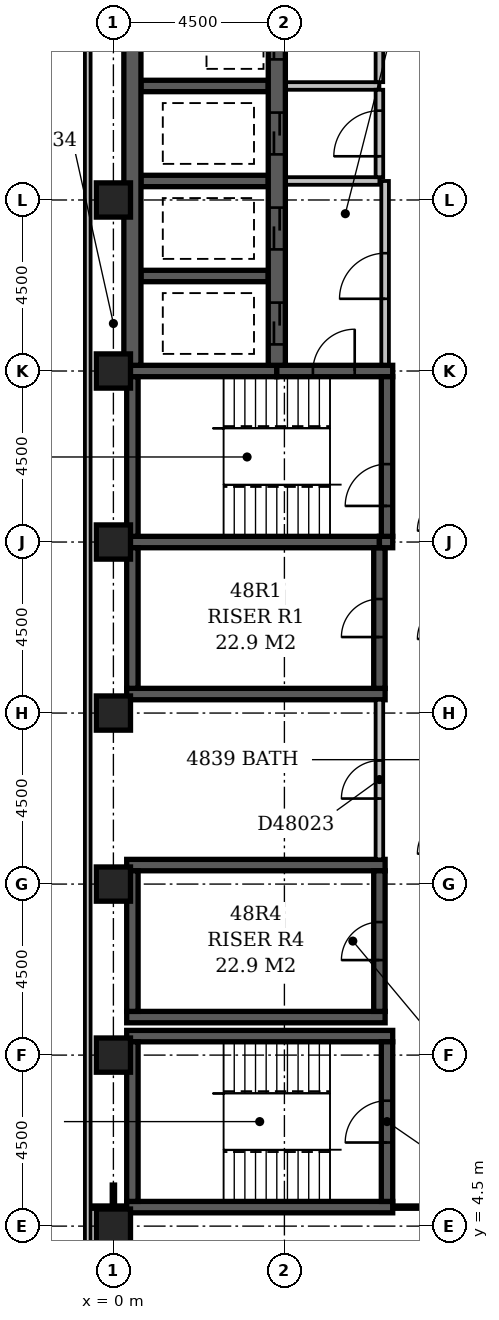
"""IFC4 building model, lengths in metres.
Left out: names, types, materials, properties, quantities, classifications, styles, units other than length and angle.
Written with IfcOpenShell. Run it as: python <this file> out.ifc"""

import sys

from ifc_helpers import new_model, si_unit, direction, frame, frame_2d, origin, origin_2d, place, context, subcontext, project, spatial, rectangle, extrude, element, fill, save


model = new_model("IFC4")
c1 = context("Model", 3, precision=1e-05, world=origin(), true_north=direction((0.0, 1.0)))
c2 = subcontext(c1, "Body", "Model", "MODEL_VIEW")
j1 = project(units=[si_unit("LENGTHUNIT", "METRE"), si_unit("PLANEANGLEUNIT", "RADIAN")], contexts=[c1])
p1 = place(None, origin())
s1 = spatial("IfcSite", under=j1, at=p1, CompositionType="ELEMENT")
p2 = place(p1, origin())
s2 = spatial("IfcBuilding", under=s1, at=p2, CompositionType="ELEMENT")
p3 = place(p2, frame((0.0, 0.0, 189.8)))
s3 = spatial("IfcBuildingStorey", under=s2, at=p3, CompositionType="ELEMENT", Elevation=189.8)
for number, where, z_axis, x_axis in (
    (1, (0.35, 5.0, -0.3), (0.0, 0.0, 1.0), (1.0, 0.0, 0.0)),
    (2, (0.35, 9.5, -0.3), (0.0, 0.0, 1.0), (1.0, 0.0, 0.0)),
):
    element("IfcWall", number, at=place(p3, frame(where, z_axis=z_axis, x_axis=x_axis)), inside=s3, PredefinedType="SHEAR", context=c2, shape_type="SweptSolid", body=[
        extrude(rectangle(XDim=7.0, YDim=0.3, at=frame_2d((3.5, 0.0))), origin(), (0.0, 0.0, 1.0), 3.6),
    ])
for number, where, z_axis, x_axis in (
    (3, (0.35, 10.0, -0.3), (0.0, 0.0, 1.0), (1.0, 0.0, 0.0)),
    (4, (0.35, 14.0, -0.3), (0.0, 0.0, 1.0), (1.0, 0.0, 0.0)),
    (5, (0.35, 18.5, -0.3), (0.0, 0.0, 1.0), (1.0, 0.0, 0.0)),
):
    element("IfcWall", number, at=place(p3, frame(where, z_axis=z_axis, x_axis=x_axis)), inside=s3, PredefinedType="SHEAR", context=c2, shape_type="SweptSolid", body=[
        extrude(rectangle(XDim=6.8, YDim=0.3, at=frame_2d((3.4, 0.0))), origin(), (0.0, 0.0, 1.0), 3.6),
    ])
p4 = place(p3, frame((0.35, 22.5, -0.3), z_axis=(0.0, 0.0, 1.0), x_axis=(1.0, 0.0, 0.0)))
e6 = element("IfcWall", 6, at=p4, inside=s3, PredefinedType="SHEAR", context=c2, shape_type="SweptSolid", body=[
    extrude(rectangle(XDim=6.65, YDim=0.3, at=frame_2d((3.325, 0.0))), origin(), (0.0, 0.0, 1.0), 3.6),
])
p5 = place(p3, frame((0.35, 27.0, -0.3), z_axis=(0.0, 0.0, 1.0), x_axis=(1.0, 0.0, 0.0)))
e7 = element("IfcWall", 7, at=p5, inside=s3, PredefinedType="SHEAR", context=c2, shape_type="SweptSolid", body=[
    extrude(rectangle(XDim=3.95, YDim=0.3, at=frame_2d((1.975, 0.0))), origin(), (0.0, 0.0, 1.0), 3.6),
])
p6 = place(p3, frame((0.5, 5.15, -0.3), z_axis=(0.0, 0.0, 1.0), x_axis=(0.0, 1.0, 0.0)))
e8 = element("IfcWall", 8, at=p6, inside=s3, PredefinedType="SHEAR", context=c2, shape_type="SweptSolid", body=[
    extrude(rectangle(XDim=4.2, YDim=0.3, at=frame_2d((2.1, 0.0))), origin(), (0.0, 0.0, 1.0), 3.6),
])
for number, where, z_axis, x_axis in (
    (9, (0.5, 10.15, -0.3), (0.0, 0.0, 1.0), (0.0, 1.0, 0.0)),
    (10, (0.5, 18.65, -0.3), (0.0, 0.0, 1.0), (0.0, 1.0, 0.0)),
):
    element("IfcWall", number, at=place(p3, frame(where, z_axis=z_axis, x_axis=x_axis)), inside=s3, PredefinedType="SHEAR", context=c2, shape_type="SweptSolid", body=[
        extrude(rectangle(XDim=3.7, YDim=0.3, at=frame_2d((1.85, 0.0))), origin(), (0.0, 0.0, 1.0), 3.6),
    ])
p7 = place(p3, frame((0.5, 22.65, -0.3), z_axis=(0.0, 0.0, 1.0), x_axis=(0.0, 1.0, 0.0)))
e11 = element("IfcWall", 11, at=p7, inside=s3, PredefinedType="SHEAR", context=c2, shape_type="SweptSolid", body=[
    extrude(rectangle(XDim=4.2, YDim=0.3, at=frame_2d((2.1, 0.0))), origin(), (0.0, 0.0, 1.0), 3.6),
])
p8 = place(p3, frame((0.5, 27.15, -0.3), z_axis=(0.0, 0.0, 1.0), x_axis=(0.0, 1.0, 0.0)))
e12 = element("IfcWall", 12, at=p8, inside=s3, PredefinedType="SHEAR", context=c2, shape_type="SweptSolid", body=[
    extrude(rectangle(XDim=22.125, YDim=0.45, at=frame_2d((11.062, 0.0))), origin(), (0.0, 0.0, 1.0), 3.6),
])
for number, where, z_axis, x_axis in (
    (13, (0.725, 29.5, -0.3), (0.0, 0.0, 1.0), (1.0, 0.0, 0.0)),
    (14, (0.725, 32.0, -0.3), (0.0, 0.0, 1.0), (1.0, 0.0, 0.0)),
    (15, (0.725, 34.5, -0.3), (0.0, 0.0, 1.0), (1.0, 0.0, 0.0)),
):
    element("IfcWall", number, at=place(p3, frame(where, z_axis=z_axis, x_axis=x_axis)), inside=s3, PredefinedType="SHEAR", context=c2, shape_type="SweptSolid", body=[
        extrude(rectangle(XDim=3.35, YDim=0.3, at=frame_2d((1.675, 0.0))), origin(), (0.0, 0.0, 1.0), 3.6),
    ])
p9 = place(p3, frame((4.3, 27.0, -0.3), z_axis=(0.0, 0.0, 1.0), x_axis=(1.0, 0.0, 0.0)))
e16 = element("IfcWall", 16, at=p9, inside=s3, PredefinedType="SHEAR", context=c2, shape_type="SweptSolid", body=[
    extrude(rectangle(XDim=3.05, YDim=0.3, at=frame_2d((1.525, 0.0))), origin(), (0.0, 0.0, 1.0), 3.6),
])
p10 = place(p9, frame((0.95, 0.0, 0.3)))
e17 = element("IfcOpeningElement", 17, at=p10, cuts=e16, PredefinedType="OPENING", context=c2, shape_type="SweptSolid", body=[
    extrude(rectangle(XDim=1.1, YDim=2.1, at=frame_2d((0.55, 1.05))), frame((0.0, 0.162, 0.0), z_axis=(0.0, -1.0, 0.0), x_axis=(1.0, 0.0, 0.0)), (0.0, 0.0, 1.0), 0.324),
])
p11 = place(p3, frame((4.3, 27.15, -0.3), z_axis=(0.0, 0.0, 1.0), x_axis=(0.0, 1.0, 0.0)))
e18 = element("IfcWall", 18, at=p11, inside=s3, PredefinedType="SHEAR", context=c2, shape_type="SweptSolid", body=[
    extrude(rectangle(XDim=22.125, YDim=0.45, at=frame_2d((11.062, 0.0))), origin(), (0.0, 0.0, 1.0), 3.6),
])
p12 = place(p11, frame((3.05, 0.0, 0.3)))
e19 = element("IfcOpeningElement", 19, at=p12, cuts=e18, PredefinedType="OPENING", context=c2, shape_type="SweptSolid", body=[
    extrude(rectangle(XDim=1.1, YDim=2.1, at=frame_2d((0.55, 1.05))), frame((0.0, 0.237, 0.0), z_axis=(0.0, -1.0, 0.0), x_axis=(1.0, 0.0, 0.0)), (0.0, 0.0, 1.0), 0.474),
])
p13 = place(p11, frame((0.55, 0.0, 0.3)))
e20 = element("IfcOpeningElement", 20, at=p13, cuts=e18, PredefinedType="OPENING", context=c2, shape_type="SweptSolid", body=[
    extrude(rectangle(XDim=1.1, YDim=2.1, at=frame_2d((0.55, 1.05))), frame((0.0, 0.237, 0.0), z_axis=(0.0, -1.0, 0.0), x_axis=(1.0, 0.0, 0.0)), (0.0, 0.0, 1.0), 0.474),
])
p14 = place(p11, frame((20.55, 0.0, 0.3)))
e21 = element("IfcOpeningElement", 21, at=p14, cuts=e18, PredefinedType="OPENING", context=c2, shape_type="SweptSolid", body=[
    extrude(rectangle(XDim=1.1, YDim=2.1, at=frame_2d((0.55, 1.05))), frame((0.0, 0.237, 0.0), z_axis=(0.0, -1.0, 0.0), x_axis=(1.0, 0.0, 0.0)), (0.0, 0.0, 1.0), 0.474),
])
p15 = place(p11, frame((18.05, 0.0, 0.3)))
e22 = element("IfcOpeningElement", 22, at=p15, cuts=e18, PredefinedType="OPENING", context=c2, shape_type="SweptSolid", body=[
    extrude(rectangle(XDim=1.1, YDim=2.1, at=frame_2d((0.55, 1.05))), frame((0.0, 0.237, 0.0), z_axis=(0.0, -1.0, 0.0), x_axis=(1.0, 0.0, 0.0)), (0.0, 0.0, 1.0), 0.474),
])
p16 = place(p11, frame((15.55, 0.0, 0.3)))
e23 = element("IfcOpeningElement", 23, at=p16, cuts=e18, PredefinedType="OPENING", context=c2, shape_type="SweptSolid", body=[
    extrude(rectangle(XDim=1.1, YDim=2.1, at=frame_2d((0.55, 1.05))), frame((0.0, 0.237, 0.0), z_axis=(0.0, -1.0, 0.0), x_axis=(1.0, 0.0, 0.0)), (0.0, 0.0, 1.0), 0.474),
])
p17 = place(p11, frame((13.05, 0.0, 0.3)))
e24 = element("IfcOpeningElement", 24, at=p17, cuts=e18, PredefinedType="OPENING", context=c2, shape_type="SweptSolid", body=[
    extrude(rectangle(XDim=1.1, YDim=2.1, at=frame_2d((0.55, 1.05))), frame((0.0, 0.237, 0.0), z_axis=(0.0, -1.0, 0.0), x_axis=(1.0, 0.0, 0.0)), (0.0, 0.0, 1.0), 0.474),
])
p18 = place(p11, frame((10.55, 0.0, 0.3)))
e25 = element("IfcOpeningElement", 25, at=p18, cuts=e18, PredefinedType="OPENING", context=c2, shape_type="SweptSolid", body=[
    extrude(rectangle(XDim=1.1, YDim=2.1, at=frame_2d((0.55, 1.05))), frame((0.0, 0.237, 0.0), z_axis=(0.0, -1.0, 0.0), x_axis=(1.0, 0.0, 0.0)), (0.0, 0.0, 1.0), 0.474),
])
p19 = place(p11, frame((8.05, 0.0, 0.3)))
e26 = element("IfcOpeningElement", 26, at=p19, cuts=e18, PredefinedType="OPENING", context=c2, shape_type="SweptSolid", body=[
    extrude(rectangle(XDim=1.1, YDim=2.1, at=frame_2d((0.55, 1.05))), frame((0.0, 0.237, 0.0), z_axis=(0.0, -1.0, 0.0), x_axis=(1.0, 0.0, 0.0)), (0.0, 0.0, 1.0), 0.474),
])
p20 = place(p11, frame((5.55, 0.0, 0.3)))
e27 = element("IfcOpeningElement", 27, at=p20, cuts=e18, PredefinedType="OPENING", context=c2, shape_type="SweptSolid", body=[
    extrude(rectangle(XDim=1.1, YDim=2.1, at=frame_2d((0.55, 1.05))), frame((0.0, 0.237, 0.0), z_axis=(0.0, -1.0, 0.0), x_axis=(1.0, 0.0, 0.0)), (0.0, 0.0, 1.0), 0.474),
])
p21 = place(p3, frame((7.0, 10.15, -0.3), z_axis=(0.0, 0.0, 1.0), x_axis=(0.0, 1.0, 0.0)))
e28 = element("IfcWall", 28, at=p21, inside=s3, PredefinedType="SHEAR", context=c2, shape_type="SweptSolid", body=[
    extrude(rectangle(XDim=3.7, YDim=0.3, at=frame_2d((1.85, 0.0))), origin(), (0.0, 0.0, 1.0), 3.6),
])
p22 = place(p21, frame((1.35, 0.0, 0.3)))
e29 = element("IfcOpeningElement", 29, at=p22, cuts=e28, PredefinedType="OPENING", context=c2, shape_type="SweptSolid", body=[
    extrude(rectangle(XDim=1.0, YDim=2.1, at=frame_2d((0.5, 1.05))), frame((0.0, 0.162, 0.0), z_axis=(0.0, -1.0, 0.0), x_axis=(1.0, 0.0, 0.0)), (0.0, 0.0, 1.0), 0.324),
])
p23 = place(p3, frame((7.0, 18.65, -0.3), z_axis=(0.0, 0.0, 1.0), x_axis=(0.0, 1.0, 0.0)))
e30 = element("IfcWall", 30, at=p23, inside=s3, PredefinedType="SHEAR", context=c2, shape_type="SweptSolid", body=[
    extrude(rectangle(XDim=3.7, YDim=0.3, at=frame_2d((1.85, 0.0))), origin(), (0.0, 0.0, 1.0), 3.6),
])
p24 = place(p23, frame((1.35, 0.0, 0.3)))
e31 = element("IfcOpeningElement", 31, at=p24, cuts=e30, PredefinedType="OPENING", context=c2, shape_type="SweptSolid", body=[
    extrude(rectangle(XDim=1.0, YDim=2.1, at=frame_2d((0.5, 1.05))), frame((0.0, 0.162, 0.0), z_axis=(0.0, -1.0, 0.0), x_axis=(1.0, 0.0, 0.0)), (0.0, 0.0, 1.0), 0.324),
])
p25 = place(p3, frame((7.0, 22.5, -0.3), z_axis=(0.0, 0.0, 1.0), x_axis=(1.0, 0.0, 0.0)))
e32 = element("IfcWall", 32, at=p25, inside=s3, PredefinedType="SHEAR", context=c2, shape_type="SweptSolid", body=[
    extrude(rectangle(XDim=0.35, YDim=0.3, at=frame_2d((0.175, 0.0))), origin(), (0.0, 0.0, 1.0), 3.6),
])
p26 = place(p3, frame((7.2, 5.15, -0.3), z_axis=(0.0, 0.0, 1.0), x_axis=(0.0, 1.0, 0.0)))
e33 = element("IfcWall", 33, at=p26, inside=s3, PredefinedType="SHEAR", context=c2, shape_type="SweptSolid", body=[
    extrude(rectangle(XDim=4.2, YDim=0.3, at=frame_2d((2.1, 0.0))), origin(), (0.0, 0.0, 1.0), 3.6),
])
p27 = place(p26, frame((1.55, 0.0, 0.3)))
e34 = element("IfcOpeningElement", 34, at=p27, cuts=e33, PredefinedType="OPENING", context=c2, shape_type="SweptSolid", body=[
    extrude(rectangle(XDim=1.1, YDim=2.1, at=frame_2d((0.55, 1.05))), frame((0.0, 0.162, 0.0), z_axis=(0.0, -1.0, 0.0), x_axis=(1.0, 0.0, 0.0)), (0.0, 0.0, 1.0), 0.324),
])
p28 = place(p3, frame((7.2, 22.65, -0.3), z_axis=(0.0, 0.0, 1.0), x_axis=(0.0, 1.0, 0.0)))
e35 = element("IfcWall", 35, at=p28, inside=s3, PredefinedType="SHEAR", context=c2, shape_type="SweptSolid", body=[
    extrude(rectangle(XDim=4.2, YDim=0.3, at=frame_2d((2.1, 0.0))), origin(), (0.0, 0.0, 1.0), 3.6),
])
p29 = place(p28, frame((0.8, 0.0, 0.3)))
e36 = element("IfcOpeningElement", 36, at=p29, cuts=e35, PredefinedType="OPENING", context=c2, shape_type="SweptSolid", body=[
    extrude(rectangle(XDim=1.1, YDim=2.1, at=frame_2d((0.55, 1.05))), frame((0.0, 0.162, 0.0), z_axis=(0.0, -1.0, 0.0), x_axis=(1.0, 0.0, 0.0)), (0.0, 0.0, 1.0), 0.324),
])
for number, where, z_axis, x_axis in (
    (37, (0.0, 4.5, -0.3), (0.0, 0.0, 1.0), (1.0, 0.0, 0.0)),
    (38, (0.0, 9.0, -0.3), (0.0, 0.0, 1.0), (1.0, 0.0, 0.0)),
    (39, (0.0, 13.5, -0.3), (0.0, 0.0, 1.0), (1.0, 0.0, 0.0)),
    (40, (0.0, 18.0, -0.3), (0.0, 0.0, 1.0), (1.0, 0.0, 0.0)),
    (41, (0.0, 22.5, -0.3), (0.0, 0.0, 1.0), (1.0, 0.0, 0.0)),
    (42, (0.0, 27.0, -0.3), (0.0, 0.0, 1.0), (1.0, 0.0, 0.0)),
    (43, (0.0, 31.5, -0.3), (0.0, 0.0, 1.0), (1.0, 0.0, 0.0)),
):
    element("IfcColumn", number, at=place(p3, frame(where, z_axis=z_axis, x_axis=x_axis)), inside=s3, PredefinedType="COLUMN", context=c2, shape_type="SweptSolid", body=[
        extrude(rectangle(XDim=0.9, YDim=0.9, at=origin_2d()), origin(), (0.0, 0.0, 1.0), 3.6),
    ])
p30 = place(p3, frame((-0.675, 59.1, 0.0), z_axis=(0.0, 0.0, 1.0), x_axis=(0.0, -1.0, 0.0)))
e44 = element("IfcWall", 44, at=p30, inside=s3, PredefinedType="STANDARD", context=c2, shape_type="SweptSolid", body=[
    extrude(rectangle(XDim=55.35, YDim=0.15, at=frame_2d((27.675, 0.0))), origin(), (0.0, 0.0, 1.0), 2.7),
])
p31 = place(p3, frame((4.545, 34.5, 0.0), z_axis=(0.0, 0.0, 1.0), x_axis=(1.0, 0.0, 0.0)))
e45 = element("IfcWall", 45, at=p31, inside=s3, PredefinedType="PARTITIONING", context=c2, shape_type="SweptSolid", body=[
    extrude(rectangle(XDim=2.455, YDim=0.2, at=frame_2d((1.228, 0.0))), origin(), (0.0, 0.0, 1.0), 3.3),
])
p32 = place(p3, frame((7.0, 34.6, 0.0), z_axis=(0.0, 0.0, 1.0), x_axis=(0.0, 1.0, 0.0)))
e46 = element("IfcWall", 46, at=p32, inside=s3, PredefinedType="PARTITIONING", context=c2, shape_type="SweptSolid", body=[
    extrude(rectangle(XDim=14.9, YDim=0.2, at=frame_2d((7.45, 0.0))), origin(), (0.0, 0.0, 1.0), 3.3),
])
p33 = place(p32, frame((2.8, 0.0, 0.0)))
e47 = element("IfcOpeningElement", 47, at=p33, cuts=e46, PredefinedType="OPENING", context=c2, shape_type="SweptSolid", body=[
    extrude(rectangle(XDim=1.2, YDim=2.1, at=frame_2d((0.6, 1.05))), frame((0.0, 0.112, 0.0), z_axis=(0.0, -1.0, 0.0), x_axis=(1.0, 0.0, 0.0)), (0.0, 0.0, 1.0), 0.224),
])
p34 = place(p32, frame((9.8, 0.0, 0.0)))
e48 = element("IfcOpeningElement", 48, at=p34, cuts=e46, PredefinedType="OPENING", context=c2, shape_type="SweptSolid", body=[
    extrude(rectangle(XDim=1.2, YDim=2.1, at=frame_2d((0.6, 1.05))), frame((0.0, 0.112, 0.0), z_axis=(0.0, -1.0, 0.0), x_axis=(1.0, 0.0, 0.0)), (0.0, 0.0, 1.0), 0.224),
])
p35 = place(p3, frame((4.545, 32.0, 0.0), z_axis=(0.0, 0.0, 1.0), x_axis=(1.0, 0.0, 0.0)))
e49 = element("IfcWall", 49, at=p35, inside=s3, PredefinedType="PARTITIONING", context=c2, shape_type="SweptSolid", body=[
    extrude(rectangle(XDim=2.455, YDim=0.2, at=frame_2d((1.228, 0.0))), origin(), (0.0, 0.0, 1.0), 3.3),
])
p36 = place(p3, frame((7.0, 32.1, 0.0), z_axis=(0.0, 0.0, 1.0), x_axis=(0.0, 1.0, 0.0)))
e50 = element("IfcWall", 50, at=p36, inside=s3, PredefinedType="PARTITIONING", context=c2, shape_type="SweptSolid", body=[
    extrude(rectangle(XDim=2.3, YDim=0.2, at=frame_2d((1.15, 0.0))), origin(), (0.0, 0.0, 1.0), 3.3),
])
p37 = place(p36, frame((0.55, 0.0, 0.0)))
e51 = element("IfcOpeningElement", 51, at=p37, cuts=e50, PredefinedType="OPENING", context=c2, shape_type="SweptSolid", body=[
    extrude(rectangle(XDim=1.2, YDim=2.1, at=frame_2d((0.6, 1.05))), frame((0.0, 0.112, 0.0), z_axis=(0.0, -1.0, 0.0), x_axis=(1.0, 0.0, 0.0)), (0.0, 0.0, 1.0), 0.224),
])
p38 = place(p3, frame((7.15, 27.17, 0.0), z_axis=(0.0, 0.0, 1.0), x_axis=(0.0, 1.0, 0.0)))
e52 = element("IfcWall", 52, at=p38, inside=s3, PredefinedType="PARTITIONING", context=c2, shape_type="SweptSolid", body=[
    extrude(rectangle(XDim=4.83, YDim=0.2, at=frame_2d((2.415, 0.0))), origin(), (0.0, 0.0, 1.0), 3.3),
])
p39 = place(p38, frame((1.73, 0.0, 0.0)))
e53 = element("IfcOpeningElement", 53, at=p39, cuts=e52, PredefinedType="OPENING", context=c2, shape_type="SweptSolid", body=[
    extrude(rectangle(XDim=1.2, YDim=2.1, at=frame_2d((0.6, 1.05))), frame((0.0, 0.112, 0.0), z_axis=(0.0, -1.0, 0.0), x_axis=(1.0, 0.0, 0.0)), (0.0, 0.0, 1.0), 0.224),
])
p40 = place(p3, frame((0.0, 4.95, 0.0), z_axis=(0.0, 0.0, 1.0), x_axis=(0.0, 1.0, 0.0)))
e54 = element("IfcWall", 54, at=p40, inside=s3, PredefinedType="PARTITIONING", context=c2, shape_type="SweptSolid", body=[
    extrude(rectangle(XDim=0.65, YDim=0.1, at=frame_2d((0.325, 0.0))), origin(), (0.0, 0.0, 1.0), 2.7),
])
p41 = place(p3, frame((-0.6, 5.0, 0.0), z_axis=(0.0, 0.0, 1.0), x_axis=(1.0, 0.0, 0.0)))
e55 = element("IfcWall", 55, at=p41, inside=s3, PredefinedType="PARTITIONING", context=c2, shape_type="SweptSolid", body=[
    extrude(rectangle(XDim=0.951, YDim=0.1, at=frame_2d((0.476, 0.0))), origin(), (0.0, 0.0, 1.0), 3.3),
])
p42 = place(p3, frame((7.349, 5.0, 0.0), z_axis=(0.0, 0.0, 1.0), x_axis=(1.0, 0.0, 0.0)))
e56 = element("IfcWall", 56, at=p42, inside=s3, PredefinedType="PARTITIONING", context=c2, shape_type="SweptSolid", body=[
    extrude(rectangle(XDim=1.551, YDim=0.1, at=frame_2d((0.775, 0.0))), origin(), (0.0, 0.0, 1.0), 3.3),
])
p43 = place(p3, frame((7.0, 14.15, 0.0), z_axis=(0.0, 0.0, 1.0), x_axis=(0.0, 1.0, 0.0)))
e57 = element("IfcWall", 57, at=p43, inside=s3, PredefinedType="PARTITIONING", context=c2, shape_type="SweptSolid", body=[
    extrude(rectangle(XDim=4.2, YDim=0.2, at=frame_2d((2.1, 0.0))), origin(), (0.0, 0.0, 1.0), 3.3),
])
p44 = place(p43, frame((1.6, 0.0, 0.0)))
e58 = element("IfcOpeningElement", 58, at=p44, cuts=e57, PredefinedType="OPENING", context=c2, shape_type="SweptSolid", body=[
    extrude(rectangle(XDim=1.0, YDim=2.1, at=frame_2d((0.5, 1.05))), frame((0.0, 0.112, 0.0), z_axis=(0.0, -1.0, 0.0), x_axis=(1.0, 0.0, 0.0)), (0.0, 0.0, 1.0), 0.224),
])
p45 = place(p39, origin())
e59 = element("IfcDoor", 59, at=p45, inside=s3, OperationType="SINGLE_SWING_LEFT", PredefinedType="DOOR", context=c2, shape_type="SweptSolid", body=[
    extrude(rectangle(XDim=1.2, YDim=2.1, at=frame_2d((0.6, 1.05))), frame((0.0, 0.025, 0.0), z_axis=(0.0, -1.0, 0.0), x_axis=(1.0, 0.0, 0.0)), (0.0, 0.0, 1.0), 0.05),
])
fill(e53, e59)
p46 = place(p12, origin())
e60 = element("IfcDoor", 60, at=p46, inside=s3, OperationType="SLIDING_TO_LEFT", PredefinedType="DOOR", context=c2, shape_type="SweptSolid", body=[
    extrude(rectangle(XDim=1.1, YDim=2.1, at=frame_2d((0.55, 1.05))), frame((0.0, 0.025, 0.0), z_axis=(0.0, -1.0, 0.0), x_axis=(1.0, 0.0, 0.0)), (0.0, 0.0, 1.0), 0.05),
])
fill(e19, e60)
p47 = place(p13, origin())
e61 = element("IfcDoor", 61, at=p47, inside=s3, OperationType="SLIDING_TO_LEFT", PredefinedType="DOOR", context=c2, shape_type="SweptSolid", body=[
    extrude(rectangle(XDim=1.1, YDim=2.1, at=frame_2d((0.55, 1.05))), frame((0.0, 0.025, 0.0), z_axis=(0.0, -1.0, 0.0), x_axis=(1.0, 0.0, 0.0)), (0.0, 0.0, 1.0), 0.05),
])
fill(e20, e61)
p48 = place(p19, origin())
e62 = element("IfcDoor", 62, at=p48, inside=s3, OperationType="SLIDING_TO_LEFT", PredefinedType="DOOR", context=c2, shape_type="SweptSolid", body=[
    extrude(rectangle(XDim=1.1, YDim=2.1, at=frame_2d((0.55, 1.05))), frame((0.0, 0.025, 0.0), z_axis=(0.0, -1.0, 0.0), x_axis=(1.0, 0.0, 0.0)), (0.0, 0.0, 1.0), 0.05),
])
fill(e26, e62)
p49 = place(p37, origin())
e63 = element("IfcDoor", 63, at=p49, inside=s3, OperationType="SINGLE_SWING_LEFT", PredefinedType="DOOR", context=c2, shape_type="SweptSolid", body=[
    extrude(rectangle(XDim=1.2, YDim=2.1, at=frame_2d((0.6, 1.05))), frame((0.0, 0.025, 0.0), z_axis=(0.0, -1.0, 0.0), x_axis=(1.0, 0.0, 0.0)), (0.0, 0.0, 1.0), 0.05),
])
fill(e51, e63)
p50 = place(p20, origin())
e64 = element("IfcDoor", 64, at=p50, inside=s3, OperationType="SLIDING_TO_LEFT", PredefinedType="DOOR", context=c2, shape_type="SweptSolid", body=[
    extrude(rectangle(XDim=1.1, YDim=2.1, at=frame_2d((0.55, 1.05))), frame((0.0, 0.025, 0.0), z_axis=(0.0, -1.0, 0.0), x_axis=(1.0, 0.0, 0.0)), (0.0, 0.0, 1.0), 0.05),
])
fill(e27, e64)
p51 = place(p24, origin())
e65 = element("IfcDoor", 65, at=p51, inside=s3, OperationType="SINGLE_SWING_LEFT", PredefinedType="DOOR", context=c2, shape_type="SweptSolid", body=[
    extrude(rectangle(XDim=1.0, YDim=2.1, at=frame_2d((0.5, 1.05))), frame((0.0, 0.025, 0.0), z_axis=(0.0, -1.0, 0.0), x_axis=(1.0, 0.0, 0.0)), (0.0, 0.0, 1.0), 0.05),
])
fill(e31, e65)
p52 = place(p22, origin())
e66 = element("IfcDoor", 66, at=p52, inside=s3, OperationType="SINGLE_SWING_LEFT", PredefinedType="DOOR", context=c2, shape_type="SweptSolid", body=[
    extrude(rectangle(XDim=1.0, YDim=2.1, at=frame_2d((0.5, 1.05))), frame((0.0, 0.025, 0.0), z_axis=(0.0, -1.0, 0.0), x_axis=(1.0, 0.0, 0.0)), (0.0, 0.0, 1.0), 0.05),
])
fill(e29, e66)
p53 = place(p10, frame((1.1, 0.0, 0.0), z_axis=(0.0, 0.0, 1.0), x_axis=(-1.0, 0.0, 0.0)))
e67 = element("IfcDoor", 67, at=p53, inside=s3, OperationType="SINGLE_SWING_LEFT", PredefinedType="DOOR", context=c2, shape_type="SweptSolid", body=[
    extrude(rectangle(XDim=1.1, YDim=2.1, at=frame_2d((0.55, 1.05))), frame((0.0, 0.025, 0.0), z_axis=(0.0, -1.0, 0.0), x_axis=(1.0, 0.0, 0.0)), (0.0, 0.0, 1.0), 0.05),
])
fill(e17, e67)
p54 = place(p29, origin())
e68 = element("IfcDoor", 68, at=p54, inside=s3, OperationType="SINGLE_SWING_LEFT", PredefinedType="DOOR", context=c2, shape_type="SweptSolid", body=[
    extrude(rectangle(XDim=1.1, YDim=2.1, at=frame_2d((0.55, 1.05))), frame((0.0, 0.025, 0.0), z_axis=(0.0, -1.0, 0.0), x_axis=(1.0, 0.0, 0.0)), (0.0, 0.0, 1.0), 0.05),
])
fill(e36, e68)
p55 = place(p27, origin())
e69 = element("IfcDoor", 69, at=p55, inside=s3, OperationType="SINGLE_SWING_LEFT", PredefinedType="DOOR", context=c2, shape_type="SweptSolid", body=[
    extrude(rectangle(XDim=1.1, YDim=2.1, at=frame_2d((0.55, 1.05))), frame((0.0, 0.025, 0.0), z_axis=(0.0, -1.0, 0.0), x_axis=(1.0, 0.0, 0.0)), (0.0, 0.0, 1.0), 0.05),
])
fill(e34, e69)
p56 = place(p44, origin())
e70 = element("IfcDoor", 70, at=p56, inside=s3, OperationType="SINGLE_SWING_LEFT", PredefinedType="DOOR", context=c2, shape_type="SweptSolid", body=[
    extrude(rectangle(XDim=1.0, YDim=2.1, at=frame_2d((0.5, 1.05))), frame((0.0, 0.025, 0.0), z_axis=(0.0, -1.0, 0.0), x_axis=(1.0, 0.0, 0.0)), (0.0, 0.0, 1.0), 0.05),
])
fill(e58, e70)
save(model, sys.argv[1])
